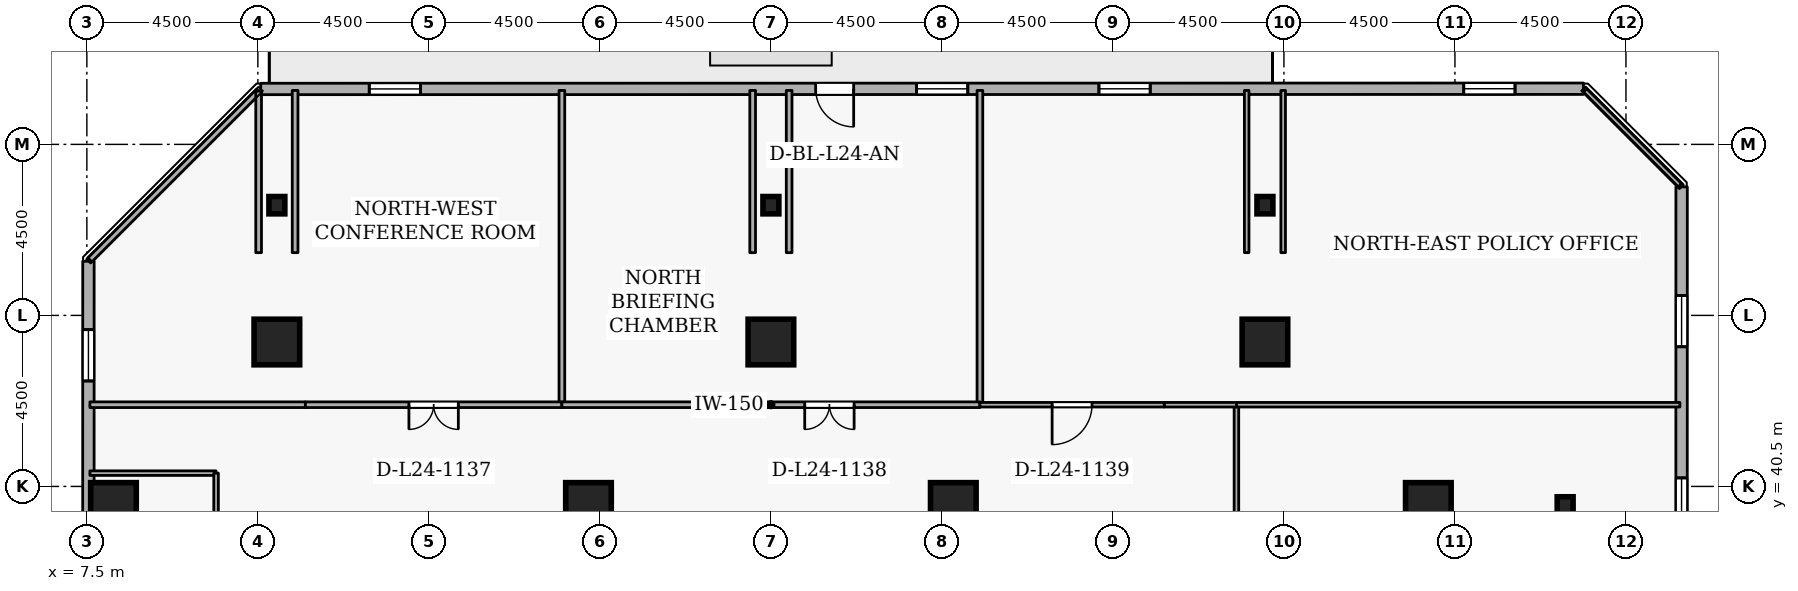
"""IFC4 building model, lengths in metres.
Left out: names, types, materials, properties, quantities, classifications, styles, units other than length and angle.
Written with IfcOpenShell. Run it as: python <this file> out.ifc"""

import sys

from ifc_helpers import new_model, si_unit, direction, frame, frame_2d, origin, origin_2d, place, context, subcontext, project, spatial, rectangle, i_section, extrude, element, fill, save


model = new_model("IFC4")
c1 = context("Model", 3, precision=1e-05, world=origin(), true_north=direction((0.0, 1.0)))
c2 = subcontext(c1, "Body", "Model", "MODEL_VIEW")
j1 = project(units=[si_unit("LENGTHUNIT", "METRE"), si_unit("PLANEANGLEUNIT", "RADIAN")], contexts=[c1])
p1 = place(None, origin())
s1 = spatial("IfcSite", under=j1, at=p1, CompositionType="ELEMENT")
p2 = place(p1, origin())
s2 = spatial("IfcBuilding", under=s1, at=p2, CompositionType="ELEMENT")
p3 = place(p2, frame((0.0, 0.0, 94.5)))
s3 = spatial("IfcBuildingStorey", under=s2, at=p3, CompositionType="ELEMENT", Elevation=94.5)
for number, where, z_axis, x_axis in (
    (1, (42.8, 40.0, 0.0), (0.0, 0.0, 1.0), (1.0, 0.0, 0.0)),
    (2, (12.5, 44.3, 0.0), (0.0, 0.0, 1.0), (1.0, 0.0, 0.0)),
    (3, (25.5, 44.3, 0.0), (0.0, 0.0, 1.0), (1.0, 0.0, 0.0)),
    (4, (38.5, 44.3, 0.0), (0.0, 0.0, 1.0), (1.0, 0.0, 0.0)),
    (5, (8.2, 40.0, 0.0), (0.0, 0.0, 1.0), (1.0, 0.0, 0.0)),
    (6, (20.7, 40.0, 0.0), (0.0, 0.0, 1.0), (1.0, 0.0, 0.0)),
    (7, (30.3, 40.0, 0.0), (0.0, 0.0, 1.0), (1.0, 0.0, 0.0)),
):
    element("IfcColumn", number, at=place(p3, frame(where, z_axis=z_axis, x_axis=x_axis)), inside=s3, PredefinedType="COLUMN", context=c2, shape_type="SweptSolid", body=[
        extrude(rectangle(XDim=1.2, YDim=1.2, at=origin_2d()), origin(), (0.0, 0.0, 1.0), 3.6),
    ])
for number, where, z_axis, x_axis in (
    (8, (46.4, 40.0, 0.0), (0.0, 0.0, 1.0), (1.0, 0.0, 0.0)),
    (9, (12.5, 47.9, 0.0), (0.0, 0.0, 1.0), (1.0, 0.0, 0.0)),
    (10, (25.5, 47.9, 0.0), (0.0, 0.0, 1.0), (1.0, 0.0, 0.0)),
    (11, (38.5, 47.9, 0.0), (0.0, 0.0, 1.0), (1.0, 0.0, 0.0)),
):
    element("IfcColumn", number, at=place(p3, frame(where, z_axis=z_axis, x_axis=x_axis)), inside=s3, PredefinedType="COLUMN", context=c2, shape_type="SweptSolid", body=[
        extrude(i_section(OverallWidth=0.418, OverallDepth=0.456, WebThickness=0.042, FlangeThickness=0.067, FilletRadius=0.015, at=origin_2d()), origin(), (0.0, 0.0, 1.0), 3.6),
    ])
p4 = place(p3, frame((49.458, 13.575, 0.0), z_axis=(0.0, 0.0, 1.0), x_axis=(0.000182370391, 0.999999983371, 0.0)))
e12 = element("IfcWall", 12, at=p4, inside=s3, PredefinedType="STANDARD", context=c2, shape_type="SweptSolid", body=[
    extrude(rectangle(XDim=34.806, YDim=0.3, at=frame_2d((17.403, 0.0))), origin(), (0.0, 0.0, 1.0), 2.22),
])
p5 = place(p4, frame((1.8, 0.0, 0.72)))
e13 = element("IfcOpeningElement", 13, at=p5, cuts=e12, PredefinedType="OPENING", context=c2, shape_type="SweptSolid", body=[
    extrude(rectangle(XDim=1.35, YDim=1.05, at=frame_2d((0.675, 0.525))), frame((0.0, 0.16, 0.0), z_axis=(0.0, -1.0, 0.0), x_axis=(1.0, 0.0, 0.0)), (0.0, 0.0, 1.0), 0.32),
])
p6 = place(p4, frame((6.6, 0.0, 0.72)))
e14 = element("IfcOpeningElement", 14, at=p6, cuts=e12, PredefinedType="OPENING", context=c2, shape_type="SweptSolid", body=[
    extrude(rectangle(XDim=1.35, YDim=1.05, at=frame_2d((0.675, 0.525))), frame((0.0, 0.16, 0.0), z_axis=(0.0, -1.0, 0.0), x_axis=(1.0, 0.0, 0.0)), (0.0, 0.0, 1.0), 0.32),
])
p7 = place(p4, frame((11.4, 0.0, 0.72)))
e15 = element("IfcOpeningElement", 15, at=p7, cuts=e12, PredefinedType="OPENING", context=c2, shape_type="SweptSolid", body=[
    extrude(rectangle(XDim=1.35, YDim=1.05, at=frame_2d((0.675, 0.525))), frame((0.0, 0.16, 0.0), z_axis=(0.0, -1.0, 0.0), x_axis=(1.0, 0.0, 0.0)), (0.0, 0.0, 1.0), 0.32),
])
p8 = place(p4, frame((21.0, 0.0, 0.72)))
e16 = element("IfcOpeningElement", 16, at=p8, cuts=e12, PredefinedType="OPENING", context=c2, shape_type="SweptSolid", body=[
    extrude(rectangle(XDim=1.35, YDim=1.05, at=frame_2d((0.675, 0.525))), frame((0.0, 0.16, 0.0), z_axis=(0.0, -1.0, 0.0), x_axis=(1.0, 0.0, 0.0)), (0.0, 0.0, 1.0), 0.32),
])
p9 = place(p4, frame((25.8, 0.0, 0.72)))
e17 = element("IfcOpeningElement", 17, at=p9, cuts=e12, PredefinedType="OPENING", context=c2, shape_type="SweptSolid", body=[
    extrude(rectangle(XDim=1.35, YDim=1.05, at=frame_2d((0.675, 0.525))), frame((0.0, 0.16, 0.0), z_axis=(0.0, -1.0, 0.0), x_axis=(1.0, 0.0, 0.0)), (0.0, 0.0, 1.0), 0.32),
])
p10 = place(p4, frame((30.6, 0.0, 0.72)))
e18 = element("IfcOpeningElement", 18, at=p10, cuts=e12, PredefinedType="OPENING", context=c2, shape_type="SweptSolid", body=[
    extrude(rectangle(XDim=1.35, YDim=1.05, at=frame_2d((0.675, 0.525))), frame((0.0, 0.16, 0.0), z_axis=(0.0, -1.0, 0.0), x_axis=(1.0, 0.0, 0.0)), (0.0, 0.0, 1.0), 0.32),
])
p11 = place(p3, frame((46.881, 50.965, 0.0), z_axis=(0.0, 0.0, 1.0), x_axis=(-0.999999983371, -0.000182370391, 0.0)))
e19 = element("IfcWall", 19, at=p11, inside=s3, PredefinedType="STANDARD", context=c2, shape_type="SweptSolid", body=[
    extrude(rectangle(XDim=34.806, YDim=0.3, at=frame_2d((17.403, 0.0))), origin(), (0.0, 0.0, 1.0), 2.22),
])
p12 = place(p11, frame((19.203, 0.0, 0.0)))
e20 = element("IfcOpeningElement", 20, at=p12, cuts=e19, PredefinedType="OPENING", context=c2, shape_type="SweptSolid", body=[
    extrude(rectangle(XDim=1.0, YDim=2.08, at=frame_2d((0.5, 1.04))), frame((0.0, 0.16, 0.0), z_axis=(0.0, -1.0, 0.0), x_axis=(1.0, 0.0, 0.0)), (0.0, 0.0, 1.0), 0.32),
])
p13 = place(p11, frame((1.8, 0.0, 0.72)))
e21 = element("IfcOpeningElement", 21, at=p13, cuts=e19, PredefinedType="OPENING", context=c2, shape_type="SweptSolid", body=[
    extrude(rectangle(XDim=1.35, YDim=1.05, at=frame_2d((0.675, 0.525))), frame((0.0, 0.16, 0.0), z_axis=(0.0, -1.0, 0.0), x_axis=(1.0, 0.0, 0.0)), (0.0, 0.0, 1.0), 0.32),
])
p14 = place(p11, frame((11.4, 0.0, 0.72)))
e22 = element("IfcOpeningElement", 22, at=p14, cuts=e19, PredefinedType="OPENING", context=c2, shape_type="SweptSolid", body=[
    extrude(rectangle(XDim=1.35, YDim=1.05, at=frame_2d((0.675, 0.525))), frame((0.0, 0.16, 0.0), z_axis=(0.0, -1.0, 0.0), x_axis=(1.0, 0.0, 0.0)), (0.0, 0.0, 1.0), 0.32),
])
p15 = place(p11, frame((16.2, 0.0, 0.72)))
e23 = element("IfcOpeningElement", 23, at=p15, cuts=e19, PredefinedType="OPENING", context=c2, shape_type="SweptSolid", body=[
    extrude(rectangle(XDim=1.35, YDim=1.05, at=frame_2d((0.675, 0.525))), frame((0.0, 0.16, 0.0), z_axis=(0.0, -1.0, 0.0), x_axis=(1.0, 0.0, 0.0)), (0.0, 0.0, 1.0), 0.32),
])
p16 = place(p11, frame((30.6, 0.0, 0.72)))
e24 = element("IfcOpeningElement", 24, at=p16, cuts=e19, PredefinedType="OPENING", context=c2, shape_type="SweptSolid", body=[
    extrude(rectangle(XDim=1.35, YDim=1.05, at=frame_2d((0.675, 0.525))), frame((0.0, 0.16, 0.0), z_axis=(0.0, -1.0, 0.0), x_axis=(1.0, 0.0, 0.0)), (0.0, 0.0, 1.0), 0.32),
])
p17 = place(p3, frame((7.542, 46.425, 0.0), z_axis=(0.0, 0.0, 1.0), x_axis=(-0.000182370391, -0.999999983371, 0.0)))
e25 = element("IfcWall", 25, at=p17, inside=s3, PredefinedType="STANDARD", context=c2, shape_type="SweptSolid", body=[
    extrude(rectangle(XDim=34.806, YDim=0.3, at=frame_2d((17.403, 0.0))), origin(), (0.0, 0.0, 1.0), 2.22),
])
p18 = place(p17, frame((1.8, 0.0, 0.72)))
e26 = element("IfcOpeningElement", 26, at=p18, cuts=e25, PredefinedType="OPENING", context=c2, shape_type="SweptSolid", body=[
    extrude(rectangle(XDim=1.35, YDim=1.05, at=frame_2d((0.675, 0.525))), frame((0.0, 0.16, 0.0), z_axis=(0.0, -1.0, 0.0), x_axis=(1.0, 0.0, 0.0)), (0.0, 0.0, 1.0), 0.32),
])
p19 = place(p17, frame((11.4, 0.0, 0.72)))
e27 = element("IfcOpeningElement", 27, at=p19, cuts=e25, PredefinedType="OPENING", context=c2, shape_type="SweptSolid", body=[
    extrude(rectangle(XDim=1.35, YDim=1.05, at=frame_2d((0.675, 0.525))), frame((0.0, 0.16, 0.0), z_axis=(0.0, -1.0, 0.0), x_axis=(1.0, 0.0, 0.0)), (0.0, 0.0, 1.0), 0.32),
])
p20 = place(p17, frame((21.0, 0.0, 0.72)))
e28 = element("IfcOpeningElement", 28, at=p20, cuts=e25, PredefinedType="OPENING", context=c2, shape_type="SweptSolid", body=[
    extrude(rectangle(XDim=1.35, YDim=1.05, at=frame_2d((0.675, 0.525))), frame((0.0, 0.16, 0.0), z_axis=(0.0, -1.0, 0.0), x_axis=(1.0, 0.0, 0.0)), (0.0, 0.0, 1.0), 0.32),
])
p21 = place(p17, frame((25.8, 0.0, 0.72)))
e29 = element("IfcOpeningElement", 29, at=p21, cuts=e25, PredefinedType="OPENING", context=c2, shape_type="SweptSolid", body=[
    extrude(rectangle(XDim=1.35, YDim=1.05, at=frame_2d((0.675, 0.525))), frame((0.0, 0.16, 0.0), z_axis=(0.0, -1.0, 0.0), x_axis=(1.0, 0.0, 0.0)), (0.0, 0.0, 1.0), 0.32),
])
p22 = place(p3, frame((7.58, 40.85, 0.0), z_axis=(0.0, 0.0, 1.0), x_axis=(1.0, 0.0, 0.0)))
e30 = element("IfcWall", 30, at=p22, inside=s3, PredefinedType="PARTITIONING", context=c2, shape_type="SweptSolid", body=[
    extrude(rectangle(XDim=3.32, YDim=0.12, at=frame_2d((1.66, 0.0))), origin(), (0.0, 0.0, 1.0), 3.3),
])
p23 = place(p3, frame((10.9, 40.85, 0.0), z_axis=(0.0, 0.0, 1.0), x_axis=(0.0, -1.0, 0.0)))
e31 = element("IfcWall", 31, at=p23, inside=s3, PredefinedType="PARTITIONING", context=c2, shape_type="SweptSolid", body=[
    extrude(rectangle(XDim=4.912, YDim=0.12, at=frame_2d((2.456, 0.0))), origin(), (0.0, 0.0, 1.0), 3.3),
])
p24 = place(p3, frame((37.75, 33.3, 0.0), z_axis=(0.0, 0.0, 1.0), x_axis=(0.0, 1.0, 0.0)))
e32 = element("IfcWall", 32, at=p24, inside=s3, PredefinedType="PARTITIONING", context=c2, shape_type="SweptSolid", body=[
    extrude(rectangle(XDim=9.35, YDim=0.12, at=frame_2d((4.675, 0.0))), origin(), (0.0, 0.0, 1.0), 3.3),
])
p25 = place(p24, frame((4.15, 0.0, 0.0)))
e33 = element("IfcOpeningElement", 33, at=p25, cuts=e32, PredefinedType="OPENING", context=c2, shape_type="SweptSolid", body=[
    extrude(rectangle(XDim=1.05, YDim=2.1, at=frame_2d((0.525, 1.05))), frame((0.0, 0.07, 0.0), z_axis=(0.0, -1.0, 0.0), x_axis=(1.0, 0.0, 0.0)), (0.0, 0.0, 1.0), 0.14),
])
p26 = place(p3, frame((37.75, 42.65, 0.0), z_axis=(0.0, 0.0, 1.0), x_axis=(1.0, 0.0, 0.0)))
e34 = element("IfcWall", 34, at=p26, inside=s3, PredefinedType="PARTITIONING", context=c2, shape_type="SweptSolid", body=[
    extrude(rectangle(XDim=11.67, YDim=0.12, at=frame_2d((5.835, 0.0))), origin(), (0.0, 0.0, 1.0), 3.3),
])
p27 = place(p3, frame((13.25, 42.65, 0.0), z_axis=(0.0, 0.0, 1.0), x_axis=(-1.0, 0.0, 0.0)))
e35 = element("IfcWall", 35, at=p27, inside=s3, PredefinedType="PARTITIONING", context=c2, shape_type="SweptSolid", body=[
    extrude(rectangle(XDim=5.67, YDim=0.15, at=frame_2d((2.835, 0.0))), origin(), (0.0, 0.0, 1.0), 3.3),
])
p28 = place(p3, frame((7.58, 46.461, 0.0), z_axis=(0.0, 0.0, 1.0), x_axis=(0.707106781187, 0.707106781187, 0.0)))
e36 = element("IfcWall", 36, at=p28, inside=s3, PredefinedType="PARTITIONING", context=c2, shape_type="SweptSolid", body=[
    extrude(rectangle(XDim=6.279, YDim=0.15, at=frame_2d((3.14, 0.0))), origin(), (0.0, 0.0, 1.0), 3.3),
])
p29 = place(p3, frame((12.02, 50.901, 0.0), z_axis=(0.0, 0.0, 1.0), x_axis=(0.0, -1.0, 0.0)))
e37 = element("IfcWall", 37, at=p29, inside=s3, PredefinedType="PARTITIONING", context=c2, shape_type="SweptSolid", body=[
    extrude(rectangle(XDim=4.25, YDim=0.15, at=frame_2d((2.125, 0.0))), origin(), (0.0, 0.0, 1.0), 1.685),
])
p30 = place(p3, frame((12.98, 46.651, 0.0), z_axis=(0.0, 0.0, 1.0), x_axis=(0.0, 1.0, 0.0)))
e38 = element("IfcWall", 38, at=p30, inside=s3, PredefinedType="PARTITIONING", context=c2, shape_type="SweptSolid", body=[
    extrude(rectangle(XDim=4.269, YDim=0.15, at=frame_2d((2.135, 0.0))), origin(), (0.0, 0.0, 1.0), 1.685),
])
p31 = place(p3, frame((20.0, 50.92, 0.0), z_axis=(0.0, 0.0, 1.0), x_axis=(0.0, -1.0, 0.0)))
e39 = element("IfcWall", 39, at=p31, inside=s3, PredefinedType="PARTITIONING", context=c2, shape_type="SweptSolid", body=[
    extrude(rectangle(XDim=8.27, YDim=0.15, at=frame_2d((4.135, 0.0))), origin(), (0.0, 0.0, 1.0), 3.3),
])
p32 = place(p3, frame((20.0, 42.65, 0.0), z_axis=(0.0, 0.0, 1.0), x_axis=(-1.0, 0.0, 0.0)))
e40 = element("IfcWall", 40, at=p32, inside=s3, PredefinedType="PARTITIONING", context=c2, shape_type="SweptSolid", body=[
    extrude(rectangle(XDim=6.75, YDim=0.15, at=frame_2d((3.375, 0.0))), origin(), (0.0, 0.0, 1.0), 3.3),
])
p33 = place(p32, frame((2.725, 0.0, 0.0)))
e41 = element("IfcOpeningElement", 41, at=p33, cuts=e40, PredefinedType="OPENING", context=c2, shape_type="SweptSolid", body=[
    extrude(rectangle(XDim=1.3, YDim=2.12, at=frame_2d((0.65, 1.06))), frame((0.0, 0.085, 0.0), z_axis=(0.0, -1.0, 0.0), x_axis=(1.0, 0.0, 0.0)), (0.0, 0.0, 1.0), 0.17),
])
for number, where, z_axis, x_axis in (
    (42, (25.02, 50.92, 0.0), (0.0, 0.0, 1.0), (0.0, -1.0, 0.0)),
    (43, (25.98, 46.651, 0.0), (0.0, 0.0, 1.0), (0.0, 1.0, 0.0)),
):
    element("IfcWall", number, at=place(p3, frame(where, z_axis=z_axis, x_axis=x_axis)), inside=s3, PredefinedType="PARTITIONING", context=c2, shape_type="SweptSolid", body=[
        extrude(rectangle(XDim=4.269, YDim=0.15, at=frame_2d((2.135, 0.0))), origin(), (0.0, 0.0, 1.0), 1.685),
    ])
p34 = place(p3, frame((31.0, 50.92, 0.0), z_axis=(0.0, 0.0, 1.0), x_axis=(0.0, -1.0, 0.0)))
e44 = element("IfcWall", 44, at=p34, inside=s3, PredefinedType="PARTITIONING", context=c2, shape_type="SweptSolid", body=[
    extrude(rectangle(XDim=8.27, YDim=0.15, at=frame_2d((4.135, 0.0))), origin(), (0.0, 0.0, 1.0), 3.3),
])
p35 = place(p3, frame((31.0, 42.65, 0.0), z_axis=(0.0, 0.0, 1.0), x_axis=(-1.0, 0.0, 0.0)))
e45 = element("IfcWall", 45, at=p35, inside=s3, PredefinedType="PARTITIONING", context=c2, shape_type="SweptSolid", body=[
    extrude(rectangle(XDim=11.0, YDim=0.15, at=frame_2d((5.5, 0.0))), origin(), (0.0, 0.0, 1.0), 3.3),
])
p36 = place(p35, frame((3.31, 0.0, 0.0)))
e46 = element("IfcOpeningElement", 46, at=p36, cuts=e45, PredefinedType="OPENING", context=c2, shape_type="SweptSolid", body=[
    extrude(rectangle(XDim=1.3, YDim=2.12, at=frame_2d((0.65, 1.06))), frame((0.0, 0.085, 0.0), z_axis=(0.0, -1.0, 0.0), x_axis=(1.0, 0.0, 0.0)), (0.0, 0.0, 1.0), 0.17),
])
p37 = place(p3, frame((37.75, 42.65, 0.0), z_axis=(0.0, 0.0, 1.0), x_axis=(-1.0, 0.0, 0.0)))
e47 = element("IfcWall", 47, at=p37, inside=s3, PredefinedType="PARTITIONING", context=c2, shape_type="SweptSolid", body=[
    extrude(rectangle(XDim=1.9, YDim=0.12, at=frame_2d((0.95, 0.0))), origin(), (0.0, 0.0, 1.0), 2.855),
])
p38 = place(p3, frame((35.85, 42.65, 0.0), z_axis=(0.0, 0.0, 1.0), x_axis=(-1.0, 0.0, 0.0)))
e48 = element("IfcWall", 48, at=p38, inside=s3, PredefinedType="PARTITIONING", context=c2, shape_type="SweptSolid", body=[
    extrude(rectangle(XDim=4.85, YDim=0.12, at=frame_2d((2.425, 0.0))), origin(), (0.0, 0.0, 1.0), 2.855),
])
p39 = place(p38, frame((1.9, 0.0, 0.0)))
e49 = element("IfcOpeningElement", 49, at=p39, cuts=e48, PredefinedType="OPENING", context=c2, shape_type="SweptSolid", body=[
    extrude(rectangle(XDim=1.05, YDim=2.1, at=frame_2d((0.525, 1.05))), frame((0.0, 0.07, 0.0), z_axis=(0.0, -1.0, 0.0), x_axis=(1.0, 0.0, 0.0)), (0.0, 0.0, 1.0), 0.14),
])
for number, where, z_axis, x_axis in (
    (50, (38.02, 50.92, 0.0), (0.0, 0.0, 1.0), (0.0, -1.0, 0.0)),
    (51, (38.98, 46.651, 0.0), (0.0, 0.0, 1.0), (0.0, 1.0, 0.0)),
):
    element("IfcWall", number, at=place(p3, frame(where, z_axis=z_axis, x_axis=x_axis)), inside=s3, PredefinedType="PARTITIONING", context=c2, shape_type="SweptSolid", body=[
        extrude(rectangle(XDim=4.269, YDim=0.12, at=frame_2d((2.135, 0.0))), origin(), (0.0, 0.0, 1.0), 1.685),
    ])
p40 = place(p3, frame((46.925, 50.92, 0.0), z_axis=(0.0, 0.0, 1.0), x_axis=(0.707106781187, -0.707106781187, 0.0)))
e52 = element("IfcWall", 52, at=p40, inside=s3, PredefinedType="PARTITIONING", context=c2, shape_type="SweptSolid", body=[
    extrude(rectangle(XDim=3.528, YDim=0.12, at=frame_2d((1.764, 0.0))), origin(), (0.0, 0.0, 1.0), 3.3),
])
p41 = place(p9, origin())
e53 = element("IfcWindow", 53, at=p41, inside=s3, PartitioningType="SINGLE_PANEL", PredefinedType="WINDOW", context=c2, shape_type="SweptSolid", body=[
    extrude(rectangle(XDim=1.35, YDim=1.05, at=frame_2d((0.675, 0.525))), frame((0.0, 0.03, 0.0), z_axis=(0.0, -1.0, 0.0), x_axis=(1.0, 0.0, 0.0)), (0.0, 0.0, 1.0), 0.06),
])
fill(e17, e53)
p42 = place(p10, origin())
e54 = element("IfcWindow", 54, at=p42, inside=s3, PartitioningType="SINGLE_PANEL", PredefinedType="WINDOW", context=c2, shape_type="SweptSolid", body=[
    extrude(rectangle(XDim=1.35, YDim=1.05, at=frame_2d((0.675, 0.525))), frame((0.0, 0.03, 0.0), z_axis=(0.0, -1.0, 0.0), x_axis=(1.0, 0.0, 0.0)), (0.0, 0.0, 1.0), 0.06),
])
fill(e18, e54)
p43 = place(p12, origin())
e55 = element("IfcDoor", 55, at=p43, inside=s3, OperationType="SINGLE_SWING_LEFT", PredefinedType="DOOR", context=c2, shape_type="SweptSolid", body=[
    extrude(rectangle(XDim=1.0, YDim=2.08, at=frame_2d((0.5, 1.04))), frame((0.0, 0.025, 0.0), z_axis=(0.0, -1.0, 0.0), x_axis=(1.0, 0.0, 0.0)), (0.0, 0.0, 1.0), 0.05),
])
fill(e20, e55)
p44 = place(p13, origin())
e56 = element("IfcWindow", 56, at=p44, inside=s3, PartitioningType="SINGLE_PANEL", PredefinedType="WINDOW", context=c2, shape_type="SweptSolid", body=[
    extrude(rectangle(XDim=1.35, YDim=1.05, at=frame_2d((0.675, 0.525))), frame((0.0, 0.03, 0.0), z_axis=(0.0, -1.0, 0.0), x_axis=(1.0, 0.0, 0.0)), (0.0, 0.0, 1.0), 0.06),
])
fill(e21, e56)
p45 = place(p14, origin())
e57 = element("IfcWindow", 57, at=p45, inside=s3, PartitioningType="SINGLE_PANEL", PredefinedType="WINDOW", context=c2, shape_type="SweptSolid", body=[
    extrude(rectangle(XDim=1.35, YDim=1.05, at=frame_2d((0.675, 0.525))), frame((0.0, 0.03, 0.0), z_axis=(0.0, -1.0, 0.0), x_axis=(1.0, 0.0, 0.0)), (0.0, 0.0, 1.0), 0.06),
])
fill(e22, e57)
p46 = place(p15, origin())
e58 = element("IfcWindow", 58, at=p46, inside=s3, PartitioningType="SINGLE_PANEL", PredefinedType="WINDOW", context=c2, shape_type="SweptSolid", body=[
    extrude(rectangle(XDim=1.35, YDim=1.05, at=frame_2d((0.675, 0.525))), frame((0.0, 0.03, 0.0), z_axis=(0.0, -1.0, 0.0), x_axis=(1.0, 0.0, 0.0)), (0.0, 0.0, 1.0), 0.06),
])
fill(e23, e58)
p47 = place(p16, origin())
e59 = element("IfcWindow", 59, at=p47, inside=s3, PartitioningType="SINGLE_PANEL", PredefinedType="WINDOW", context=c2, shape_type="SweptSolid", body=[
    extrude(rectangle(XDim=1.35, YDim=1.05, at=frame_2d((0.675, 0.525))), frame((0.0, 0.03, 0.0), z_axis=(0.0, -1.0, 0.0), x_axis=(1.0, 0.0, 0.0)), (0.0, 0.0, 1.0), 0.06),
])
fill(e24, e59)
p48 = place(p18, origin())
e60 = element("IfcWindow", 60, at=p48, inside=s3, PartitioningType="SINGLE_PANEL", PredefinedType="WINDOW", context=c2, shape_type="SweptSolid", body=[
    extrude(rectangle(XDim=1.35, YDim=1.05, at=frame_2d((0.675, 0.525))), frame((0.0, 0.03, 0.0), z_axis=(0.0, -1.0, 0.0), x_axis=(1.0, 0.0, 0.0)), (0.0, 0.0, 1.0), 0.06),
])
fill(e26, e60)
p49 = place(p33, origin())
e61 = element("IfcDoor", 61, at=p49, inside=s3, OperationType="DOUBLE_DOOR_SINGLE_SWING", PredefinedType="DOOR", context=c2, shape_type="SweptSolid", body=[
    extrude(rectangle(XDim=1.3, YDim=2.12, at=frame_2d((0.65, 1.06))), frame((0.0, 0.025, 0.0), z_axis=(0.0, -1.0, 0.0), x_axis=(1.0, 0.0, 0.0)), (0.0, 0.0, 1.0), 0.05),
])
fill(e41, e61)
p50 = place(p36, origin())
e62 = element("IfcDoor", 62, at=p50, inside=s3, OperationType="DOUBLE_DOOR_SINGLE_SWING", PredefinedType="DOOR", context=c2, shape_type="SweptSolid", body=[
    extrude(rectangle(XDim=1.3, YDim=2.12, at=frame_2d((0.65, 1.06))), frame((0.0, 0.025, 0.0), z_axis=(0.0, -1.0, 0.0), x_axis=(1.0, 0.0, 0.0)), (0.0, 0.0, 1.0), 0.05),
])
fill(e46, e62)
p51 = place(p39, origin())
e63 = element("IfcDoor", 63, at=p51, inside=s3, OperationType="SINGLE_SWING_RIGHT", PredefinedType="DOOR", context=c2, shape_type="SweptSolid", body=[
    extrude(rectangle(XDim=1.05, YDim=2.1, at=frame_2d((0.525, 1.05))), frame((0.0, 0.025, 0.0), z_axis=(0.0, -1.0, 0.0), x_axis=(1.0, 0.0, 0.0)), (0.0, 0.0, 1.0), 0.05),
])
fill(e49, e63)
save(model, sys.argv[1])
